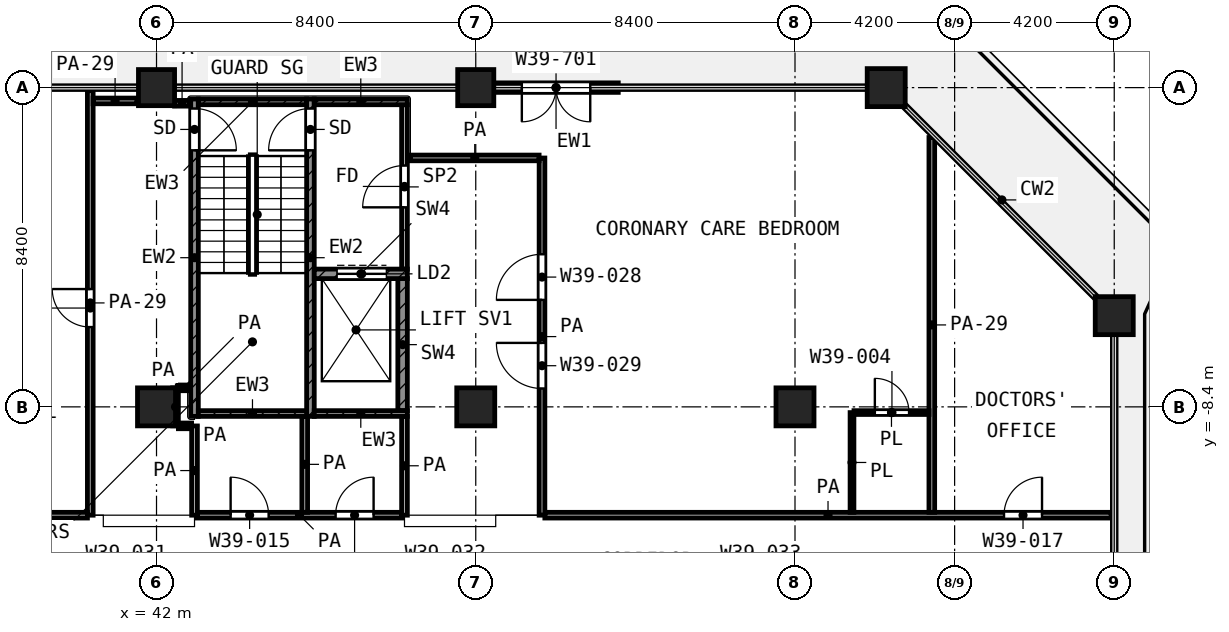
"""IFC4 building model, lengths in metres.
Left out: names, types, materials, properties, quantities, classifications, styles, units other than length and angle.
Written with IfcOpenShell. Run it as: python <this file> out.ifc"""

import sys

from ifc_helpers import new_model, si_unit, direction, frame, frame_2d, origin, origin_2d, place, context, subcontext, project, spatial, rectangle, extrude, element, fill, save


model = new_model("IFC4")
c1 = context("Model", 3, precision=1e-05, world=origin(), true_north=direction((0.0, 1.0)))
c2 = subcontext(c1, "Body", "Model", "MODEL_VIEW")
j1 = project(units=[si_unit("LENGTHUNIT", "METRE"), si_unit("PLANEANGLEUNIT", "RADIAN")], contexts=[c1])
p1 = place(None, origin())
s1 = spatial("IfcSite", under=j1, at=p1, CompositionType="ELEMENT")
p2 = place(p1, origin())
s2 = spatial("IfcBuilding", under=s1, at=p2, CompositionType="ELEMENT")
p3 = place(p2, frame((0.0, 0.0, 171.0)))
s3 = spatial("IfcBuildingStorey", under=s2, at=p3, CompositionType="ELEMENT", Elevation=171.0)
for number, where, z_axis, x_axis in (
    (1, (42.0, 0.0, 0.0), (0.0, 0.0, 1.0), (1.0, 0.0, 0.0)),
    (2, (50.4, 0.0, 0.0), (0.0, 0.0, 1.0), (1.0, 0.0, 0.0)),
):
    element("IfcColumn", number, at=place(p3, frame(where, z_axis=z_axis, x_axis=x_axis)), inside=s3, PredefinedType="COLUMN", context=c2, shape_type="SweptSolid", body=[
        extrude(rectangle(XDim=0.95, YDim=0.95, at=origin_2d()), origin(), (0.0, 0.0, 1.0), 4.2),
    ])
for number, where, z_axis, x_axis in (
    (3, (61.2, 0.0, 0.0), (0.0, 0.0, 1.0), (1.0, 0.0, 0.0)),
    (4, (67.2, -6.0, 0.0), (0.0, 0.0, 1.0), (1.0, 0.0, 0.0)),
    (5, (42.0, -8.4, 0.0), (0.0, 0.0, 1.0), (1.0, 0.0, 0.0)),
    (6, (50.4, -8.4, 0.0), (0.0, 0.0, 1.0), (1.0, 0.0, 0.0)),
    (7, (58.8, -8.4, 0.0), (0.0, 0.0, 1.0), (1.0, 0.0, 0.0)),
):
    element("IfcColumn", number, at=place(p3, frame(where, z_axis=z_axis, x_axis=x_axis)), inside=s3, PredefinedType="COLUMN", context=c2, shape_type="SweptSolid", body=[
        extrude(rectangle(XDim=1.0, YDim=1.0, at=origin_2d()), origin(), (0.0, 0.0, 1.0), 4.2),
    ])
p4 = place(p3, frame((54.15, 0.0, 0.0), z_axis=(0.0, 0.0, 1.0), x_axis=(-1.0, 0.0, 0.0)))
e8 = element("IfcWall", 8, at=p4, inside=s3, PredefinedType="SOLIDWALL", context=c2, shape_type="SweptSolid", body=[
    extrude(rectangle(XDim=3.275, YDim=0.25, at=frame_2d((1.637, 0.0))), origin(), (0.0, 0.0, 1.0), 2.58),
])
p5 = place(p4, frame((0.738, 0.0, 0.0)))
e9 = element("IfcOpeningElement", 9, at=p5, cuts=e8, PredefinedType="OPENING", context=c2, shape_type="SweptSolid", body=[
    extrude(rectangle(XDim=1.8, YDim=2.1, at=frame_2d((0.9, 1.05))), frame((0.0, 0.135, 0.0), z_axis=(0.0, -1.0, 0.0), x_axis=(1.0, 0.0, 0.0)), (0.0, 0.0, 1.0), 0.27),
])
p6 = place(p3, frame((43.0, -8.65, 0.0), z_axis=(0.0, 0.0, 1.0), x_axis=(0.0, 1.0, 0.0)))
e10 = element("IfcWall", 10, at=p6, inside=s3, PredefinedType="SHEAR", context=c2, shape_type="SweptSolid", body=[
    extrude(rectangle(XDim=8.35, YDim=0.2, at=frame_2d((4.175, 0.0))), origin(), (0.0, 0.0, 1.0), 3.6),
])
p7 = place(p6, frame((7.0, 0.0, 0.0)))
e11 = element("IfcOpeningElement", 11, at=p7, cuts=e10, PredefinedType="OPENING", context=c2, shape_type="SweptSolid", body=[
    extrude(rectangle(XDim=1.1, YDim=2.1, at=frame_2d((0.55, 1.05))), frame((0.0, 0.11, 0.0), z_axis=(0.0, -1.0, 0.0), x_axis=(1.0, 0.0, 0.0)), (0.0, 0.0, 1.0), 0.22),
])
p8 = place(p3, frame((46.05, -8.65, 0.0), z_axis=(0.0, 0.0, 1.0), x_axis=(0.0, 1.0, 0.0)))
e12 = element("IfcWall", 12, at=p8, inside=s3, PredefinedType="SHEAR", context=c2, shape_type="SweptSolid", body=[
    extrude(rectangle(XDim=8.35, YDim=0.2, at=frame_2d((4.175, 0.0))), origin(), (0.0, 0.0, 1.0), 3.6),
])
p9 = place(p8, frame((7.0, 0.0, 0.0)))
e13 = element("IfcOpeningElement", 13, at=p9, cuts=e12, PredefinedType="OPENING", context=c2, shape_type="SweptSolid", body=[
    extrude(rectangle(XDim=1.1, YDim=2.1, at=frame_2d((0.55, 1.05))), frame((0.0, 0.11, 0.0), z_axis=(0.0, -1.0, 0.0), x_axis=(1.0, 0.0, 0.0)), (0.0, 0.0, 1.0), 0.22),
])
p10 = place(p3, frame((43.1, -0.375, 0.0), z_axis=(0.0, 0.0, 1.0), x_axis=(1.0, 0.0, 0.0)))
e14 = element("IfcWall", 14, at=p10, inside=s3, PredefinedType="SHEAR", context=c2, shape_type="SweptSolid", body=[
    extrude(rectangle(XDim=2.85, YDim=0.15, at=frame_2d((1.425, 0.0))), origin(), (0.0, 0.0, 1.0), 3.6),
])
p11 = place(p3, frame((46.15, -0.375, 0.0), z_axis=(0.0, 0.0, 1.0), x_axis=(1.0, 0.0, 0.0)))
e15 = element("IfcWall", 15, at=p11, inside=s3, PredefinedType="SHEAR", context=c2, shape_type="SweptSolid", body=[
    extrude(rectangle(XDim=2.45, YDim=0.15, at=frame_2d((1.225, 0.0))), origin(), (0.0, 0.0, 1.0), 3.6),
])
p12 = place(p3, frame((43.1, -8.575, 0.0), z_axis=(0.0, 0.0, 1.0), x_axis=(1.0, 0.0, 0.0)))
e16 = element("IfcWall", 16, at=p12, inside=s3, PredefinedType="SHEAR", context=c2, shape_type="SweptSolid", body=[
    extrude(rectangle(XDim=2.85, YDim=0.15, at=frame_2d((1.425, 0.0))), origin(), (0.0, 0.0, 1.0), 3.6),
])
p13 = place(p3, frame((46.15, -8.575, 0.0), z_axis=(0.0, 0.0, 1.0), x_axis=(1.0, 0.0, 0.0)))
e17 = element("IfcWall", 17, at=p13, inside=s3, PredefinedType="SHEAR", context=c2, shape_type="SweptSolid", body=[
    extrude(rectangle(XDim=2.45, YDim=0.15, at=frame_2d((1.225, 0.0))), origin(), (0.0, 0.0, 1.0), 3.6),
])
p14 = place(p3, frame((46.15, -4.9, 0.0), z_axis=(0.0, 0.0, 1.0), x_axis=(1.0, 0.0, 0.0)))
e18 = element("IfcWall", 18, at=p14, inside=s3, PredefinedType="SHEAR", context=c2, shape_type="SweptSolid", body=[
    extrude(rectangle(XDim=2.45, YDim=0.25, at=frame_2d((1.225, 0.0))), origin(), (0.0, 0.0, 1.0), 3.6),
])
p15 = place(p14, frame((0.6, 0.0, 0.0)))
e19 = element("IfcOpeningElement", 19, at=p15, cuts=e18, PredefinedType="OPENING", context=c2, shape_type="SweptSolid", body=[
    extrude(rectangle(XDim=1.3, YDim=2.1, at=frame_2d((0.65, 1.05))), frame((0.0, 0.135, 0.0), z_axis=(0.0, -1.0, 0.0), x_axis=(1.0, 0.0, 0.0)), (0.0, 0.0, 1.0), 0.27),
])
p16 = place(p3, frame((48.475, -8.5, 0.0), z_axis=(0.0, 0.0, 1.0), x_axis=(0.0, 1.0, 0.0)))
e20 = element("IfcWall", 20, at=p16, inside=s3, PredefinedType="SHEAR", context=c2, shape_type="SweptSolid", body=[
    extrude(rectangle(XDim=3.475, YDim=0.25, at=frame_2d((1.738, 0.0))), origin(), (0.0, 0.0, 1.0), 3.6),
])
p17 = place(p3, frame((48.525, -4.775, 0.0), z_axis=(0.0, 0.0, 1.0), x_axis=(0.0, 1.0, 0.0)))
e21 = element("IfcWall", 21, at=p17, inside=s3, PredefinedType="PARTITIONING", context=c2, shape_type="SweptSolid", body=[
    extrude(rectangle(XDim=4.325, YDim=0.15, at=frame_2d((2.163, 0.0))), origin(), (0.0, 0.0, 1.0), 3.6),
])
p18 = place(p17, frame((1.625, 0.0, 0.0)))
e22 = element("IfcOpeningElement", 22, at=p18, cuts=e21, PredefinedType="OPENING", context=c2, shape_type="SweptSolid", body=[
    extrude(rectangle(XDim=1.1, YDim=2.1, at=frame_2d((0.55, 1.05))), frame((0.0, 0.085, 0.0), z_axis=(0.0, -1.0, 0.0), x_axis=(1.0, 0.0, 0.0)), (0.0, 0.0, 1.0), 0.17),
])
p19 = place(p3, frame((60.352, -8.55, 0.0), z_axis=(0.0, 0.0, 1.0), x_axis=(1.0, 0.0, 0.0)))
e23 = element("IfcWall", 23, at=p19, inside=s3, PredefinedType="PARTITIONING", context=c2, shape_type="SweptSolid", body=[
    extrude(rectangle(XDim=1.973, YDim=0.1, at=frame_2d((0.986, 0.0))), origin(), (0.0, 0.0, 1.0), 3.6),
])
p20 = place(p19, frame((0.549, 0.0, 0.0)))
e24 = element("IfcOpeningElement", 24, at=p20, cuts=e23, PredefinedType="OPENING", context=c2, shape_type="SweptSolid", body=[
    extrude(rectangle(XDim=0.9, YDim=2.1, at=frame_2d((0.45, 1.05))), frame((0.0, 0.06, 0.0), z_axis=(0.0, -1.0, 0.0), x_axis=(1.0, 0.0, 0.0)), (0.0, 0.0, 1.0), 0.12),
])
p21 = place(p3, frame((60.3, -11.175, 0.0), z_axis=(0.0, 0.0, 1.0), x_axis=(0.0, 1.0, 0.0)))
e25 = element("IfcWall", 25, at=p21, inside=s3, PredefinedType="PARTITIONING", context=c2, shape_type="SweptSolid", body=[
    extrude(rectangle(XDim=2.624, YDim=0.1, at=frame_2d((1.312, 0.0))), origin(), (0.0, 0.0, 1.0), 3.6),
])
p22 = place(p3, frame((29.4, -11.25, 0.0), z_axis=(0.0, 0.0, 1.0), x_axis=(1.0, 0.0, 0.0)))
e26 = element("IfcWall", 26, at=p22, inside=s3, PredefinedType="PARTITIONING", context=c2, shape_type="SweptSolid", body=[
    extrude(rectangle(XDim=10.782, YDim=0.15, at=frame_2d((5.391, 0.0))), origin(), (0.0, 0.0, 1.0), 3.6),
])
p23 = place(p22, frame((4.5, 0.0, 0.0)))
e27 = element("IfcOpeningElement", 27, at=p23, cuts=e26, PredefinedType="OPENING", context=c2, shape_type="SweptSolid", body=[
    extrude(rectangle(XDim=1.2, YDim=2.1, at=frame_2d((0.6, 1.05))), frame((0.0, 0.085, 0.0), z_axis=(0.0, -1.0, 0.0), x_axis=(1.0, 0.0, 0.0)), (0.0, 0.0, 1.0), 0.17),
])
p24 = place(p22, frame((1.5, 0.0, 0.0)))
e28 = element("IfcOpeningElement", 28, at=p24, cuts=e26, PredefinedType="OPENING", context=c2, shape_type="SweptSolid", body=[
    extrude(rectangle(XDim=1.2, YDim=2.1, at=frame_2d((0.6, 1.05))), frame((0.0, 0.085, 0.0), z_axis=(0.0, -1.0, 0.0), x_axis=(1.0, 0.0, 0.0)), (0.0, 0.0, 1.0), 0.17),
])
p25 = place(p3, frame((43.075, -11.25, 0.0), z_axis=(0.0, 0.0, 1.0), x_axis=(1.0, 0.0, 0.0)))
e29 = element("IfcWall", 29, at=p25, inside=s3, PredefinedType="PARTITIONING", context=c2, shape_type="SweptSolid", body=[
    extrude(rectangle(XDim=5.375, YDim=0.15, at=frame_2d((2.688, 0.0))), origin(), (0.0, 0.0, 1.0), 3.6),
])
p26 = place(p25, frame((0.875, 0.0, 0.0)))
e30 = element("IfcOpeningElement", 30, at=p26, cuts=e29, PredefinedType="OPENING", context=c2, shape_type="SweptSolid", body=[
    extrude(rectangle(XDim=1.0, YDim=2.1, at=frame_2d((0.5, 1.05))), frame((0.0, 0.085, 0.0), z_axis=(0.0, -1.0, 0.0), x_axis=(1.0, 0.0, 0.0)), (0.0, 0.0, 1.0), 0.17),
])
p27 = place(p25, frame((3.637, 0.0, 0.0)))
e31 = element("IfcOpeningElement", 31, at=p27, cuts=e29, PredefinedType="OPENING", context=c2, shape_type="SweptSolid", body=[
    extrude(rectangle(XDim=1.0, YDim=2.1, at=frame_2d((0.5, 1.05))), frame((0.0, 0.085, 0.0), z_axis=(0.0, -1.0, 0.0), x_axis=(1.0, 0.0, 0.0)), (0.0, 0.0, 1.0), 0.17),
])
p28 = place(p3, frame((52.218, -11.25, 0.0), z_axis=(0.0, 0.0, 1.0), x_axis=(1.0, 0.0, 0.0)))
e32 = element("IfcWall", 32, at=p28, inside=s3, PredefinedType="PARTITIONING", context=c2, shape_type="SweptSolid", body=[
    extrude(rectangle(XDim=14.902, YDim=0.15, at=frame_2d((7.451, 0.0))), origin(), (0.0, 0.0, 1.0), 3.6),
])
p29 = place(p28, frame((12.082, 0.0, 0.0)))
e33 = element("IfcOpeningElement", 33, at=p29, cuts=e32, PredefinedType="OPENING", context=c2, shape_type="SweptSolid", body=[
    extrude(rectangle(XDim=1.0, YDim=2.1, at=frame_2d((0.5, 1.05))), frame((0.0, 0.085, 0.0), z_axis=(0.0, -1.0, 0.0), x_axis=(1.0, 0.0, 0.0)), (0.0, 0.0, 1.0), 0.17),
])
p30 = place(p3, frame((42.576, -8.9, 0.0), z_axis=(0.0, 0.0, 1.0), x_axis=(1.0, 0.0, 0.0)))
e34 = element("IfcWall", 34, at=p30, inside=s3, PredefinedType="PARTITIONING", context=c2, shape_type="SweptSolid", body=[
    extrude(rectangle(XDim=0.347, YDim=0.15, at=frame_2d((0.174, 0.0))), origin(), (0.0, 0.0, 1.0), 3.6),
])
p31 = place(p3, frame((42.576, -7.9, 0.0), z_axis=(0.0, 0.0, 1.0), x_axis=(1.0, 0.0, 0.0)))
e35 = element("IfcWall", 35, at=p31, inside=s3, PredefinedType="PARTITIONING", context=c2, shape_type="SweptSolid", body=[
    extrude(rectangle(XDim=0.244, YDim=0.15, at=frame_2d((0.122, 0.0))), origin(), (0.0, 0.0, 1.0), 3.6),
])
p32 = place(p3, frame((48.68, -1.85, 0.0), z_axis=(0.0, 0.0, 1.0), x_axis=(1.0, 0.0, 0.0)))
e36 = element("IfcWall", 36, at=p32, inside=s3, PredefinedType="PARTITIONING", context=c2, shape_type="SweptSolid", body=[
    extrude(rectangle(XDim=3.387, YDim=0.15, at=frame_2d((1.693, 0.0))), origin(), (0.0, 0.0, 1.0), 3.6),
])
p33 = place(p3, frame((42.475, -0.412, 0.0), z_axis=(0.0, 0.0, 1.0), x_axis=(1.0, 0.0, 0.0)))
e37 = element("IfcWall", 37, at=p33, inside=s3, PredefinedType="PARTITIONING", context=c2, shape_type="SweptSolid", body=[
    extrude(rectangle(XDim=0.395, YDim=0.15, at=frame_2d((0.198, 0.0))), origin(), (0.0, 0.0, 1.0), 3.6),
])
p34 = place(p3, frame((40.332, -0.35, 0.0), z_axis=(0.0, 0.0, 1.0), x_axis=(1.0, 0.0, 0.0)))
e38 = element("IfcWall", 38, at=p34, inside=s3, PredefinedType="PARTITIONING", context=c2, shape_type="SweptSolid", body=[
    extrude(rectangle(XDim=1.156, YDim=0.15, at=frame_2d((0.578, 0.0))), origin(), (0.0, 0.0, 1.0), 2.7),
])
p35 = place(p3, frame((40.257, -11.25, 0.0), z_axis=(0.0, 0.0, 1.0), x_axis=(0.0, 1.0, 0.0)))
e39 = element("IfcWall", 39, at=p35, inside=s3, PredefinedType="PARTITIONING", context=c2, shape_type="SweptSolid", body=[
    extrude(rectangle(XDim=11.17, YDim=0.15, at=frame_2d((5.585, 0.0))), origin(), (0.0, 0.0, 1.0), 2.7),
])
p36 = place(p35, frame((4.95, 0.0, 0.0)))
e40 = element("IfcOpeningElement", 40, at=p36, cuts=e39, PredefinedType="OPENING", context=c2, shape_type="SweptSolid", body=[
    extrude(rectangle(XDim=1.0, YDim=2.1, at=frame_2d((0.5, 1.05))), frame((0.0, 0.085, 0.0), z_axis=(0.0, -1.0, 0.0), x_axis=(1.0, 0.0, 0.0)), (0.0, 0.0, 1.0), 0.17),
])
p37 = place(p3, frame((42.5, -8.899, 0.0), z_axis=(0.0, 0.0, 1.0), x_axis=(0.0, 1.0, 0.0)))
e41 = element("IfcWall", 41, at=p37, inside=s3, PredefinedType="PARTITIONING", context=c2, shape_type="SweptSolid", body=[
    extrude(rectangle(XDim=0.998, YDim=0.15, at=frame_2d((0.499, 0.0))), origin(), (0.0, 0.0, 1.0), 3.6),
])
p38 = place(p3, frame((43.0, -11.25, 0.0), z_axis=(0.0, 0.0, 1.0), x_axis=(0.0, 1.0, 0.0)))
e42 = element("IfcWall", 42, at=p38, inside=s3, PredefinedType="PARTITIONING", context=c2, shape_type="SweptSolid", body=[
    extrude(rectangle(XDim=2.348, YDim=0.15, at=frame_2d((1.174, 0.0))), origin(), (0.0, 0.0, 1.0), 3.6),
])
p39 = place(p3, frame((45.9, -11.175, 0.0), z_axis=(0.0, 0.0, 1.0), x_axis=(0.0, 1.0, 0.0)))
e43 = element("IfcWall", 43, at=p39, inside=s3, PredefinedType="PARTITIONING", context=c2, shape_type="SweptSolid", body=[
    extrude(rectangle(XDim=2.525, YDim=0.15, at=frame_2d((1.263, 0.0))), origin(), (0.0, 0.0, 1.0), 3.6),
])
p40 = place(p3, frame((48.525, -11.25, 0.0), z_axis=(0.0, 0.0, 1.0), x_axis=(0.0, 1.0, 0.0)))
e44 = element("IfcWall", 44, at=p40, inside=s3, PredefinedType="PARTITIONING", context=c2, shape_type="SweptSolid", body=[
    extrude(rectangle(XDim=2.6, YDim=0.15, at=frame_2d((1.3, 0.0))), origin(), (0.0, 0.0, 1.0), 3.6),
])
p41 = place(p3, frame((52.143, -11.25, 0.0), z_axis=(0.0, 0.0, 1.0), x_axis=(0.0, 1.0, 0.0)))
e45 = element("IfcWall", 45, at=p41, inside=s3, PredefinedType="PARTITIONING", context=c2, shape_type="SweptSolid", body=[
    extrude(rectangle(XDim=9.398, YDim=0.15, at=frame_2d((4.699, 0.0))), origin(), (0.0, 0.0, 1.0), 3.6),
])
p42 = place(p41, frame((5.665, 0.0, 0.0)))
e46 = element("IfcOpeningElement", 46, at=p42, cuts=e45, PredefinedType="OPENING", context=c2, shape_type="SweptSolid", body=[
    extrude(rectangle(XDim=1.2, YDim=2.1, at=frame_2d((0.6, 1.05))), frame((0.0, 0.085, 0.0), z_axis=(0.0, -1.0, 0.0), x_axis=(1.0, 0.0, 0.0)), (0.0, 0.0, 1.0), 0.17),
])
p43 = place(p41, frame((3.333, 0.0, 0.0)))
e47 = element("IfcOpeningElement", 47, at=p43, cuts=e45, PredefinedType="OPENING", context=c2, shape_type="SweptSolid", body=[
    extrude(rectangle(XDim=1.2, YDim=2.1, at=frame_2d((0.6, 1.05))), frame((0.0, 0.085, 0.0), z_axis=(0.0, -1.0, 0.0), x_axis=(1.0, 0.0, 0.0)), (0.0, 0.0, 1.0), 0.17),
])
p44 = place(p3, frame((62.4, -11.175, 0.0), z_axis=(0.0, 0.0, 1.0), x_axis=(0.0, 1.0, 0.0)))
e48 = element("IfcWall", 48, at=p44, inside=s3, PredefinedType="PARTITIONING", context=c2, shape_type="SweptSolid", body=[
    extrude(rectangle(XDim=9.862, YDim=0.15, at=frame_2d((4.931, 0.0))), origin(), (0.0, 0.0, 1.0), 2.7),
])
p45 = place(p5, origin())
e49 = element("IfcDoor", 49, at=p45, inside=s3, OperationType="DOUBLE_DOOR_SINGLE_SWING", PredefinedType="DOOR", context=c2, shape_type="SweptSolid", body=[
    extrude(rectangle(XDim=1.8, YDim=2.1, at=frame_2d((0.9, 1.05))), frame((0.0, 0.025, 0.0), z_axis=(0.0, -1.0, 0.0), x_axis=(1.0, 0.0, 0.0)), (0.0, 0.0, 1.0), 0.05),
])
fill(e9, e49)
p46 = place(p7, frame((1.1, 0.0, 0.0), z_axis=(0.0, 0.0, 1.0), x_axis=(-1.0, 0.0, 0.0)))
e50 = element("IfcDoor", 50, at=p46, inside=s3, OperationType="SINGLE_SWING_LEFT", PredefinedType="DOOR", context=c2, shape_type="SweptSolid", body=[
    extrude(rectangle(XDim=1.1, YDim=2.1, at=frame_2d((0.55, 1.05))), frame((0.0, 0.025, 0.0), z_axis=(0.0, -1.0, 0.0), x_axis=(1.0, 0.0, 0.0)), (0.0, 0.0, 1.0), 0.05),
])
fill(e11, e50)
p47 = place(p9, origin())
e51 = element("IfcDoor", 51, at=p47, inside=s3, OperationType="SINGLE_SWING_LEFT", PredefinedType="DOOR", context=c2, shape_type="SweptSolid", body=[
    extrude(rectangle(XDim=1.1, YDim=2.1, at=frame_2d((0.55, 1.05))), frame((0.0, 0.025, 0.0), z_axis=(0.0, -1.0, 0.0), x_axis=(1.0, 0.0, 0.0)), (0.0, 0.0, 1.0), 0.05),
])
fill(e13, e51)
p48 = place(p15, origin())
e52 = element("IfcDoor", 52, at=p48, inside=s3, OperationType="DOUBLE_DOOR_SLIDING", PredefinedType="DOOR", context=c2, shape_type="SweptSolid", body=[
    extrude(rectangle(XDim=1.3, YDim=2.1, at=frame_2d((0.65, 1.05))), frame((0.0, 0.025, 0.0), z_axis=(0.0, -1.0, 0.0), x_axis=(1.0, 0.0, 0.0)), (0.0, 0.0, 1.0), 0.05),
])
fill(e19, e52)
p49 = place(p18, origin())
e53 = element("IfcDoor", 53, at=p49, inside=s3, OperationType="SINGLE_SWING_LEFT", PredefinedType="DOOR", context=c2, shape_type="SweptSolid", body=[
    extrude(rectangle(XDim=1.1, YDim=2.1, at=frame_2d((0.55, 1.05))), frame((0.0, 0.025, 0.0), z_axis=(0.0, -1.0, 0.0), x_axis=(1.0, 0.0, 0.0)), (0.0, 0.0, 1.0), 0.05),
])
fill(e22, e53)
p50 = place(p36, origin())
e54 = element("IfcDoor", 54, at=p50, inside=s3, OperationType="SINGLE_SWING_RIGHT", PredefinedType="DOOR", context=c2, shape_type="SweptSolid", body=[
    extrude(rectangle(XDim=1.0, YDim=2.1, at=frame_2d((0.5, 1.05))), frame((0.0, 0.025, 0.0), z_axis=(0.0, -1.0, 0.0), x_axis=(1.0, 0.0, 0.0)), (0.0, 0.0, 1.0), 0.05),
])
fill(e40, e54)
p51 = place(p26, origin())
e55 = element("IfcDoor", 55, at=p51, inside=s3, OperationType="SINGLE_SWING_LEFT", PredefinedType="DOOR", context=c2, shape_type="SweptSolid", body=[
    extrude(rectangle(XDim=1.0, YDim=2.1, at=frame_2d((0.5, 1.05))), frame((0.0, 0.025, 0.0), z_axis=(0.0, -1.0, 0.0), x_axis=(1.0, 0.0, 0.0)), (0.0, 0.0, 1.0), 0.05),
])
fill(e30, e55)
p52 = place(p27, origin())
e56 = element("IfcDoor", 56, at=p52, inside=s3, OperationType="SINGLE_SWING_RIGHT", PredefinedType="DOOR", context=c2, shape_type="SweptSolid", body=[
    extrude(rectangle(XDim=1.0, YDim=2.1, at=frame_2d((0.5, 1.05))), frame((0.0, 0.025, 0.0), z_axis=(0.0, -1.0, 0.0), x_axis=(1.0, 0.0, 0.0)), (0.0, 0.0, 1.0), 0.05),
])
fill(e31, e56)
p53 = place(p42, origin())
e57 = element("IfcDoor", 57, at=p53, inside=s3, OperationType="SINGLE_SWING_LEFT", PredefinedType="DOOR", context=c2, shape_type="SweptSolid", body=[
    extrude(rectangle(XDim=1.2, YDim=2.1, at=frame_2d((0.6, 1.05))), frame((0.0, 0.025, 0.0), z_axis=(0.0, -1.0, 0.0), x_axis=(1.0, 0.0, 0.0)), (0.0, 0.0, 1.0), 0.05),
])
fill(e46, e57)
p54 = place(p43, origin())
e58 = element("IfcDoor", 58, at=p54, inside=s3, OperationType="SINGLE_SWING_RIGHT", PredefinedType="DOOR", context=c2, shape_type="SweptSolid", body=[
    extrude(rectangle(XDim=1.2, YDim=2.1, at=frame_2d((0.6, 1.05))), frame((0.0, 0.025, 0.0), z_axis=(0.0, -1.0, 0.0), x_axis=(1.0, 0.0, 0.0)), (0.0, 0.0, 1.0), 0.05),
])
fill(e47, e58)
p55 = place(p20, origin())
e59 = element("IfcDoor", 59, at=p55, inside=s3, OperationType="SINGLE_SWING_LEFT", PredefinedType="DOOR", context=c2, shape_type="SweptSolid", body=[
    extrude(rectangle(XDim=0.9, YDim=2.1, at=frame_2d((0.45, 1.05))), frame((0.0, 0.025, 0.0), z_axis=(0.0, -1.0, 0.0), x_axis=(1.0, 0.0, 0.0)), (0.0, 0.0, 1.0), 0.05),
])
fill(e24, e59)
p56 = place(p29, origin())
e60 = element("IfcDoor", 60, at=p56, inside=s3, OperationType="SINGLE_SWING_RIGHT", PredefinedType="DOOR", context=c2, shape_type="SweptSolid", body=[
    extrude(rectangle(XDim=1.0, YDim=2.1, at=frame_2d((0.5, 1.05))), frame((0.0, 0.025, 0.0), z_axis=(0.0, -1.0, 0.0), x_axis=(1.0, 0.0, 0.0)), (0.0, 0.0, 1.0), 0.05),
])
fill(e33, e60)
save(model, sys.argv[1])
